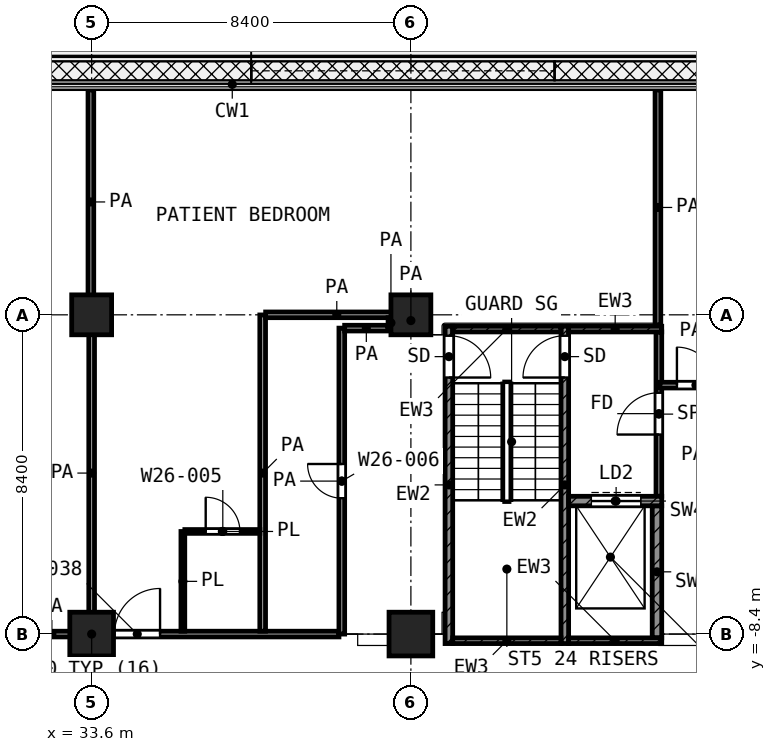
"""IFC4 building model, lengths in metres.
Left out: names, types, materials, properties, quantities, classifications, styles, units other than length and angle.
Written with IfcOpenShell. Run it as: python <this file> out.ifc"""

import sys

from ifc_helpers import new_model, si_unit, direction, frame, frame_2d, origin, origin_2d, place, context, subcontext, project, spatial, rectangle, extrude, element, fill, save


model = new_model("IFC4")
c1 = context("Model", 3, precision=1e-05, world=origin(), true_north=direction((0.0, 1.0)))
c2 = subcontext(c1, "Body", "Model", "MODEL_VIEW")
j1 = project(units=[si_unit("LENGTHUNIT", "METRE"), si_unit("PLANEANGLEUNIT", "RADIAN")], contexts=[c1])
p1 = place(None, origin())
s1 = spatial("IfcSite", under=j1, at=p1, CompositionType="ELEMENT")
p2 = place(p1, origin())
s2 = spatial("IfcBuilding", under=s1, at=p2, CompositionType="ELEMENT")
p3 = place(p2, frame((0.0, 0.0, 115.6)))
s3 = spatial("IfcBuildingStorey", under=s2, at=p3, CompositionType="ELEMENT", Elevation=115.6)
for number, where, z_axis, x_axis in (
    (1, (33.6, 0.0, 0.0), (0.0, 0.0, 1.0), (1.0, 0.0, 0.0)),
    (2, (42.0, 0.0, 0.0), (0.0, 0.0, 1.0), (1.0, 0.0, 0.0)),
):
    element("IfcColumn", number, at=place(p3, frame(where, z_axis=z_axis, x_axis=x_axis)), inside=s3, PredefinedType="COLUMN", context=c2, shape_type="SweptSolid", body=[
        extrude(rectangle(XDim=1.05, YDim=1.05, at=origin_2d()), origin(), (0.0, 0.0, 1.0), 4.2),
    ])
for number, where, z_axis, x_axis in (
    (3, (33.6, -8.4, 0.0), (0.0, 0.0, 1.0), (1.0, 0.0, 0.0)),
    (4, (42.0, -8.4, 0.0), (0.0, 0.0, 1.0), (1.0, 0.0, 0.0)),
):
    element("IfcColumn", number, at=place(p3, frame(where, z_axis=z_axis, x_axis=x_axis)), inside=s3, PredefinedType="COLUMN", context=c2, shape_type="SweptSolid", body=[
        extrude(rectangle(XDim=1.15, YDim=1.15, at=origin_2d()), origin(), (0.0, 0.0, 1.0), 4.2),
    ])
p4 = place(p3, frame((43.0, -8.65, 0.0), z_axis=(0.0, 0.0, 1.0), x_axis=(0.0, 1.0, 0.0)))
e5 = element("IfcWall", 5, at=p4, inside=s3, PredefinedType="SHEAR", context=c2, shape_type="SweptSolid", body=[
    extrude(rectangle(XDim=8.35, YDim=0.2, at=frame_2d((4.175, 0.0))), origin(), (0.0, 0.0, 1.0), 3.6),
])
p5 = place(p4, frame((7.0, 0.0, 0.0)))
e6 = element("IfcOpeningElement", 6, at=p5, cuts=e5, PredefinedType="OPENING", context=c2, shape_type="SweptSolid", body=[
    extrude(rectangle(XDim=1.1, YDim=2.1, at=frame_2d((0.55, 1.05))), frame((0.0, 0.11, 0.0), z_axis=(0.0, -1.0, 0.0), x_axis=(1.0, 0.0, 0.0)), (0.0, 0.0, 1.0), 0.22),
])
p6 = place(p3, frame((46.05, -8.65, 0.0), z_axis=(0.0, 0.0, 1.0), x_axis=(0.0, 1.0, 0.0)))
e7 = element("IfcWall", 7, at=p6, inside=s3, PredefinedType="SHEAR", context=c2, shape_type="SweptSolid", body=[
    extrude(rectangle(XDim=8.35, YDim=0.2, at=frame_2d((4.175, 0.0))), origin(), (0.0, 0.0, 1.0), 3.6),
])
p7 = place(p6, frame((7.0, 0.0, 0.0)))
e8 = element("IfcOpeningElement", 8, at=p7, cuts=e7, PredefinedType="OPENING", context=c2, shape_type="SweptSolid", body=[
    extrude(rectangle(XDim=1.1, YDim=2.1, at=frame_2d((0.55, 1.05))), frame((0.0, 0.11, 0.0), z_axis=(0.0, -1.0, 0.0), x_axis=(1.0, 0.0, 0.0)), (0.0, 0.0, 1.0), 0.22),
])
p8 = place(p3, frame((43.1, -0.375, 0.0), z_axis=(0.0, 0.0, 1.0), x_axis=(1.0, 0.0, 0.0)))
e9 = element("IfcWall", 9, at=p8, inside=s3, PredefinedType="SHEAR", context=c2, shape_type="SweptSolid", body=[
    extrude(rectangle(XDim=2.85, YDim=0.15, at=frame_2d((1.425, 0.0))), origin(), (0.0, 0.0, 1.0), 3.6),
])
p9 = place(p3, frame((46.15, -0.375, 0.0), z_axis=(0.0, 0.0, 1.0), x_axis=(1.0, 0.0, 0.0)))
e10 = element("IfcWall", 10, at=p9, inside=s3, PredefinedType="SHEAR", context=c2, shape_type="SweptSolid", body=[
    extrude(rectangle(XDim=2.45, YDim=0.15, at=frame_2d((1.225, 0.0))), origin(), (0.0, 0.0, 1.0), 3.6),
])
p10 = place(p3, frame((43.1, -8.575, 0.0), z_axis=(0.0, 0.0, 1.0), x_axis=(1.0, 0.0, 0.0)))
e11 = element("IfcWall", 11, at=p10, inside=s3, PredefinedType="SHEAR", context=c2, shape_type="SweptSolid", body=[
    extrude(rectangle(XDim=2.85, YDim=0.15, at=frame_2d((1.425, 0.0))), origin(), (0.0, 0.0, 1.0), 3.6),
])
p11 = place(p3, frame((46.15, -8.575, 0.0), z_axis=(0.0, 0.0, 1.0), x_axis=(1.0, 0.0, 0.0)))
e12 = element("IfcWall", 12, at=p11, inside=s3, PredefinedType="SHEAR", context=c2, shape_type="SweptSolid", body=[
    extrude(rectangle(XDim=2.45, YDim=0.15, at=frame_2d((1.225, 0.0))), origin(), (0.0, 0.0, 1.0), 3.6),
])
p12 = place(p3, frame((46.15, -4.9, 0.0), z_axis=(0.0, 0.0, 1.0), x_axis=(1.0, 0.0, 0.0)))
e13 = element("IfcWall", 13, at=p12, inside=s3, PredefinedType="SHEAR", context=c2, shape_type="SweptSolid", body=[
    extrude(rectangle(XDim=2.45, YDim=0.25, at=frame_2d((1.225, 0.0))), origin(), (0.0, 0.0, 1.0), 3.6),
])
p13 = place(p12, frame((0.6, 0.0, 0.0)))
e14 = element("IfcOpeningElement", 14, at=p13, cuts=e13, PredefinedType="OPENING", context=c2, shape_type="SweptSolid", body=[
    extrude(rectangle(XDim=1.3, YDim=2.1, at=frame_2d((0.65, 1.05))), frame((0.0, 0.135, 0.0), z_axis=(0.0, -1.0, 0.0), x_axis=(1.0, 0.0, 0.0)), (0.0, 0.0, 1.0), 0.27),
])
p14 = place(p3, frame((48.475, -8.5, 0.0), z_axis=(0.0, 0.0, 1.0), x_axis=(0.0, 1.0, 0.0)))
e15 = element("IfcWall", 15, at=p14, inside=s3, PredefinedType="SHEAR", context=c2, shape_type="SweptSolid", body=[
    extrude(rectangle(XDim=3.475, YDim=0.25, at=frame_2d((1.738, 0.0))), origin(), (0.0, 0.0, 1.0), 3.6),
])
p15 = place(p3, frame((48.525, -4.775, 0.0), z_axis=(0.0, 0.0, 1.0), x_axis=(0.0, 1.0, 0.0)))
e16 = element("IfcWall", 16, at=p15, inside=s3, PredefinedType="PARTITIONING", context=c2, shape_type="SweptSolid", body=[
    extrude(rectangle(XDim=4.325, YDim=0.15, at=frame_2d((2.163, 0.0))), origin(), (0.0, 0.0, 1.0), 3.6),
])
p16 = place(p15, frame((1.625, 0.0, 0.0)))
e17 = element("IfcOpeningElement", 17, at=p16, cuts=e16, PredefinedType="OPENING", context=c2, shape_type="SweptSolid", body=[
    extrude(rectangle(XDim=1.1, YDim=2.1, at=frame_2d((0.55, 1.05))), frame((0.0, 0.085, 0.0), z_axis=(0.0, -1.0, 0.0), x_axis=(1.0, 0.0, 0.0)), (0.0, 0.0, 1.0), 0.17),
])
p17 = place(p3, frame((36.052, -5.7, 0.0), z_axis=(0.0, 0.0, 1.0), x_axis=(1.0, 0.0, 0.0)))
e18 = element("IfcWall", 18, at=p17, inside=s3, PredefinedType="PARTITIONING", context=c2, shape_type="SweptSolid", body=[
    extrude(rectangle(XDim=1.973, YDim=0.1, at=frame_2d((0.986, 0.0))), origin(), (0.0, 0.0, 1.0), 3.6),
])
p18 = place(p17, frame((0.549, 0.0, 0.0)))
e19 = element("IfcOpeningElement", 19, at=p18, cuts=e18, PredefinedType="OPENING", context=c2, shape_type="SweptSolid", body=[
    extrude(rectangle(XDim=0.9, YDim=2.1, at=frame_2d((0.45, 1.05))), frame((0.0, 0.06, 0.0), z_axis=(0.0, -1.0, 0.0), x_axis=(1.0, 0.0, 0.0)), (0.0, 0.0, 1.0), 0.12),
])
p19 = place(p3, frame((36.0, -8.325, 0.0), z_axis=(0.0, 0.0, 1.0), x_axis=(0.0, 1.0, 0.0)))
e20 = element("IfcWall", 20, at=p19, inside=s3, PredefinedType="PARTITIONING", context=c2, shape_type="SweptSolid", body=[
    extrude(rectangle(XDim=2.624, YDim=0.1, at=frame_2d((1.312, 0.0))), origin(), (0.0, 0.0, 1.0), 3.6),
])
p20 = place(p3, frame((25.0, -8.4, 0.0), z_axis=(0.0, 0.0, 1.0), x_axis=(1.0, 0.0, 0.0)))
e21 = element("IfcWall", 21, at=p20, inside=s3, PredefinedType="PARTITIONING", context=c2, shape_type="SweptSolid", body=[
    extrude(rectangle(XDim=15.107, YDim=0.15, at=frame_2d((7.553, 0.0))), origin(), (0.0, 0.0, 1.0), 3.6),
])
p21 = place(p20, frame((3.65, 0.0, 0.0)))
e22 = element("IfcOpeningElement", 22, at=p21, cuts=e21, PredefinedType="OPENING", context=c2, shape_type="SweptSolid", body=[
    extrude(rectangle(XDim=1.5, YDim=2.1, at=frame_2d((0.75, 1.05))), frame((0.0, 0.085, 0.0), z_axis=(0.0, -1.0, 0.0), x_axis=(1.0, 0.0, 0.0)), (0.0, 0.0, 1.0), 0.17),
])
p22 = place(p20, frame((9.2, 0.0, 0.0)))
e23 = element("IfcOpeningElement", 23, at=p22, cuts=e21, PredefinedType="OPENING", context=c2, shape_type="SweptSolid", body=[
    extrude(rectangle(XDim=1.2, YDim=2.1, at=frame_2d((0.6, 1.05))), frame((0.0, 0.085, 0.0), z_axis=(0.0, -1.0, 0.0), x_axis=(1.0, 0.0, 0.0)), (0.0, 0.0, 1.0), 0.17),
])
p23 = place(p3, frame((48.55, -1.85, 0.0), z_axis=(0.0, 0.0, 1.0), x_axis=(1.0, 0.0, 0.0)))
e24 = element("IfcWall", 24, at=p23, inside=s3, PredefinedType="PARTITIONING", context=c2, shape_type="SweptSolid", body=[
    extrude(rectangle(XDim=2.298, YDim=0.15, at=frame_2d((1.149, 0.0))), origin(), (0.0, 0.0, 1.0), 3.6),
])
p24 = place(p23, frame((0.45, 0.0, 0.0)))
e25 = element("IfcOpeningElement", 25, at=p24, cuts=e24, PredefinedType="OPENING", context=c2, shape_type="SweptSolid", body=[
    extrude(rectangle(XDim=1.0, YDim=2.1, at=frame_2d((0.5, 1.05))), frame((0.0, 0.085, 0.0), z_axis=(0.0, -1.0, 0.0), x_axis=(1.0, 0.0, 0.0)), (0.0, 0.0, 1.0), 0.17),
])
p25 = place(p3, frame((40.257, -0.35, 0.0), z_axis=(0.0, 0.0, 1.0), x_axis=(1.0, 0.0, 0.0)))
e26 = element("IfcWall", 26, at=p25, inside=s3, PredefinedType="PARTITIONING", context=c2, shape_type="SweptSolid", body=[
    extrude(rectangle(XDim=1.141, YDim=0.15, at=frame_2d((0.57, 0.0))), origin(), (0.0, 0.0, 1.0), 3.6),
])
p26 = place(p3, frame((38.178, 0.0, 0.0), z_axis=(0.0, 0.0, 1.0), x_axis=(1.0, 0.0, 0.0)))
e27 = element("IfcWall", 27, at=p26, inside=s3, PredefinedType="PARTITIONING", context=c2, shape_type="SweptSolid", body=[
    extrude(rectangle(XDim=3.744, YDim=0.15, at=frame_2d((1.872, 0.0))), origin(), (0.0, 0.0, 1.0), 3.6),
])
p27 = place(p3, frame((33.58, 0.02, 0.0), z_axis=(0.0, 0.0, 1.0), x_axis=(0.0, 1.0, 0.0)))
e28 = element("IfcWall", 28, at=p27, inside=s3, PredefinedType="PARTITIONING", context=c2, shape_type="SweptSolid", body=[
    extrude(rectangle(XDim=5.9, YDim=0.15, at=frame_2d((2.95, 0.0))), origin(), (0.0, 0.0, 1.0), 3.6),
])
for number, where, z_axis, x_axis in (
    (29, (33.6, -8.325, 0.0), (0.0, 0.0, 1.0), (0.0, 1.0, 0.0)),
    (30, (38.1, -8.325, 0.0), (0.0, 0.0, 1.0), (0.0, 1.0, 0.0)),
):
    element("IfcWall", number, at=place(p3, frame(where, z_axis=z_axis, x_axis=x_axis)), inside=s3, PredefinedType="PARTITIONING", context=c2, shape_type="SweptSolid", body=[
        extrude(rectangle(XDim=8.322, YDim=0.15, at=frame_2d((4.161, 0.0))), origin(), (0.0, 0.0, 1.0), 3.6),
    ])
p28 = place(p3, frame((40.182, -8.4, 0.0), z_axis=(0.0, 0.0, 1.0), x_axis=(0.0, 1.0, 0.0)))
e31 = element("IfcWall", 31, at=p28, inside=s3, PredefinedType="PARTITIONING", context=c2, shape_type="SweptSolid", body=[
    extrude(rectangle(XDim=8.05, YDim=0.15, at=frame_2d((4.025, 0.0))), origin(), (0.0, 0.0, 1.0), 3.6),
])
p29 = place(p28, frame((3.575, 0.0, 0.0)))
e32 = element("IfcOpeningElement", 32, at=p29, cuts=e31, PredefinedType="OPENING", context=c2, shape_type="SweptSolid", body=[
    extrude(rectangle(XDim=0.9, YDim=2.1, at=frame_2d((0.45, 1.05))), frame((0.0, 0.085, 0.0), z_axis=(0.0, -1.0, 0.0), x_axis=(1.0, 0.0, 0.0)), (0.0, 0.0, 1.0), 0.17),
])
p30 = place(p3, frame((41.475, -0.348, 0.0), z_axis=(0.0, 0.0, 1.0), x_axis=(0.0, 1.0, 0.0)))
e33 = element("IfcWall", 33, at=p30, inside=s3, PredefinedType="PARTITIONING", context=c2, shape_type="SweptSolid", body=[
    extrude(rectangle(XDim=0.273, YDim=0.15, at=frame_2d((0.136, 0.0))), origin(), (0.0, 0.0, 1.0), 3.6),
])
p31 = place(p3, frame((42.0, -0.3, 0.0), z_axis=(0.0, 0.0, 1.0), x_axis=(0.0, 1.0, 0.0)))
e34 = element("IfcWall", 34, at=p31, inside=s3, PredefinedType="PARTITIONING", context=c2, shape_type="SweptSolid", body=[
    extrude(rectangle(XDim=0.297, YDim=0.15, at=frame_2d((0.148, 0.0))), origin(), (0.0, 0.0, 1.0), 3.6),
])
p32 = place(p3, frame((48.5, -0.27, 0.0), z_axis=(0.0, 0.0, 1.0), x_axis=(0.0, 1.0, 0.0)))
e35 = element("IfcWall", 35, at=p32, inside=s3, PredefinedType="PARTITIONING", context=c2, shape_type="SweptSolid", body=[
    extrude(rectangle(XDim=6.19, YDim=0.15, at=frame_2d((3.095, 0.0))), origin(), (0.0, 0.0, 1.0), 3.6),
])
p33 = place(p5, frame((1.1, 0.0, 0.0), z_axis=(0.0, 0.0, 1.0), x_axis=(-1.0, 0.0, 0.0)))
e36 = element("IfcDoor", 36, at=p33, inside=s3, OperationType="SINGLE_SWING_LEFT", PredefinedType="DOOR", context=c2, shape_type="SweptSolid", body=[
    extrude(rectangle(XDim=1.1, YDim=2.1, at=frame_2d((0.55, 1.05))), frame((0.0, 0.025, 0.0), z_axis=(0.0, -1.0, 0.0), x_axis=(1.0, 0.0, 0.0)), (0.0, 0.0, 1.0), 0.05),
])
fill(e6, e36)
p34 = place(p7, origin())
e37 = element("IfcDoor", 37, at=p34, inside=s3, OperationType="SINGLE_SWING_LEFT", PredefinedType="DOOR", context=c2, shape_type="SweptSolid", body=[
    extrude(rectangle(XDim=1.1, YDim=2.1, at=frame_2d((0.55, 1.05))), frame((0.0, 0.025, 0.0), z_axis=(0.0, -1.0, 0.0), x_axis=(1.0, 0.0, 0.0)), (0.0, 0.0, 1.0), 0.05),
])
fill(e8, e37)
p35 = place(p13, origin())
e38 = element("IfcDoor", 38, at=p35, inside=s3, OperationType="DOUBLE_DOOR_SLIDING", PredefinedType="DOOR", context=c2, shape_type="SweptSolid", body=[
    extrude(rectangle(XDim=1.3, YDim=2.1, at=frame_2d((0.65, 1.05))), frame((0.0, 0.025, 0.0), z_axis=(0.0, -1.0, 0.0), x_axis=(1.0, 0.0, 0.0)), (0.0, 0.0, 1.0), 0.05),
])
fill(e14, e38)
p36 = place(p16, origin())
e39 = element("IfcDoor", 39, at=p36, inside=s3, OperationType="SINGLE_SWING_LEFT", PredefinedType="DOOR", context=c2, shape_type="SweptSolid", body=[
    extrude(rectangle(XDim=1.1, YDim=2.1, at=frame_2d((0.55, 1.05))), frame((0.0, 0.025, 0.0), z_axis=(0.0, -1.0, 0.0), x_axis=(1.0, 0.0, 0.0)), (0.0, 0.0, 1.0), 0.05),
])
fill(e17, e39)
p37 = place(p22, origin())
e40 = element("IfcDoor", 40, at=p37, inside=s3, OperationType="SINGLE_SWING_RIGHT", PredefinedType="DOOR", context=c2, shape_type="SweptSolid", body=[
    extrude(rectangle(XDim=1.2, YDim=2.1, at=frame_2d((0.6, 1.05))), frame((0.0, 0.025, 0.0), z_axis=(0.0, -1.0, 0.0), x_axis=(1.0, 0.0, 0.0)), (0.0, 0.0, 1.0), 0.05),
])
fill(e23, e40)
p38 = place(p18, origin())
e41 = element("IfcDoor", 41, at=p38, inside=s3, OperationType="SINGLE_SWING_LEFT", PredefinedType="DOOR", context=c2, shape_type="SweptSolid", body=[
    extrude(rectangle(XDim=0.9, YDim=2.1, at=frame_2d((0.45, 1.05))), frame((0.0, 0.025, 0.0), z_axis=(0.0, -1.0, 0.0), x_axis=(1.0, 0.0, 0.0)), (0.0, 0.0, 1.0), 0.05),
])
fill(e19, e41)
p39 = place(p29, origin())
e42 = element("IfcDoor", 42, at=p39, inside=s3, OperationType="SINGLE_SWING_RIGHT", PredefinedType="DOOR", context=c2, shape_type="SweptSolid", body=[
    extrude(rectangle(XDim=0.9, YDim=2.1, at=frame_2d((0.45, 1.05))), frame((0.0, 0.025, 0.0), z_axis=(0.0, -1.0, 0.0), x_axis=(1.0, 0.0, 0.0)), (0.0, 0.0, 1.0), 0.05),
])
fill(e32, e42)
p40 = place(p24, origin())
e43 = element("IfcDoor", 43, at=p40, inside=s3, OperationType="SINGLE_SWING_LEFT", PredefinedType="DOOR", context=c2, shape_type="SweptSolid", body=[
    extrude(rectangle(XDim=1.0, YDim=2.1, at=frame_2d((0.5, 1.05))), frame((0.0, 0.025, 0.0), z_axis=(0.0, -1.0, 0.0), x_axis=(1.0, 0.0, 0.0)), (0.0, 0.0, 1.0), 0.05),
])
fill(e25, e43)
save(model, sys.argv[1])
